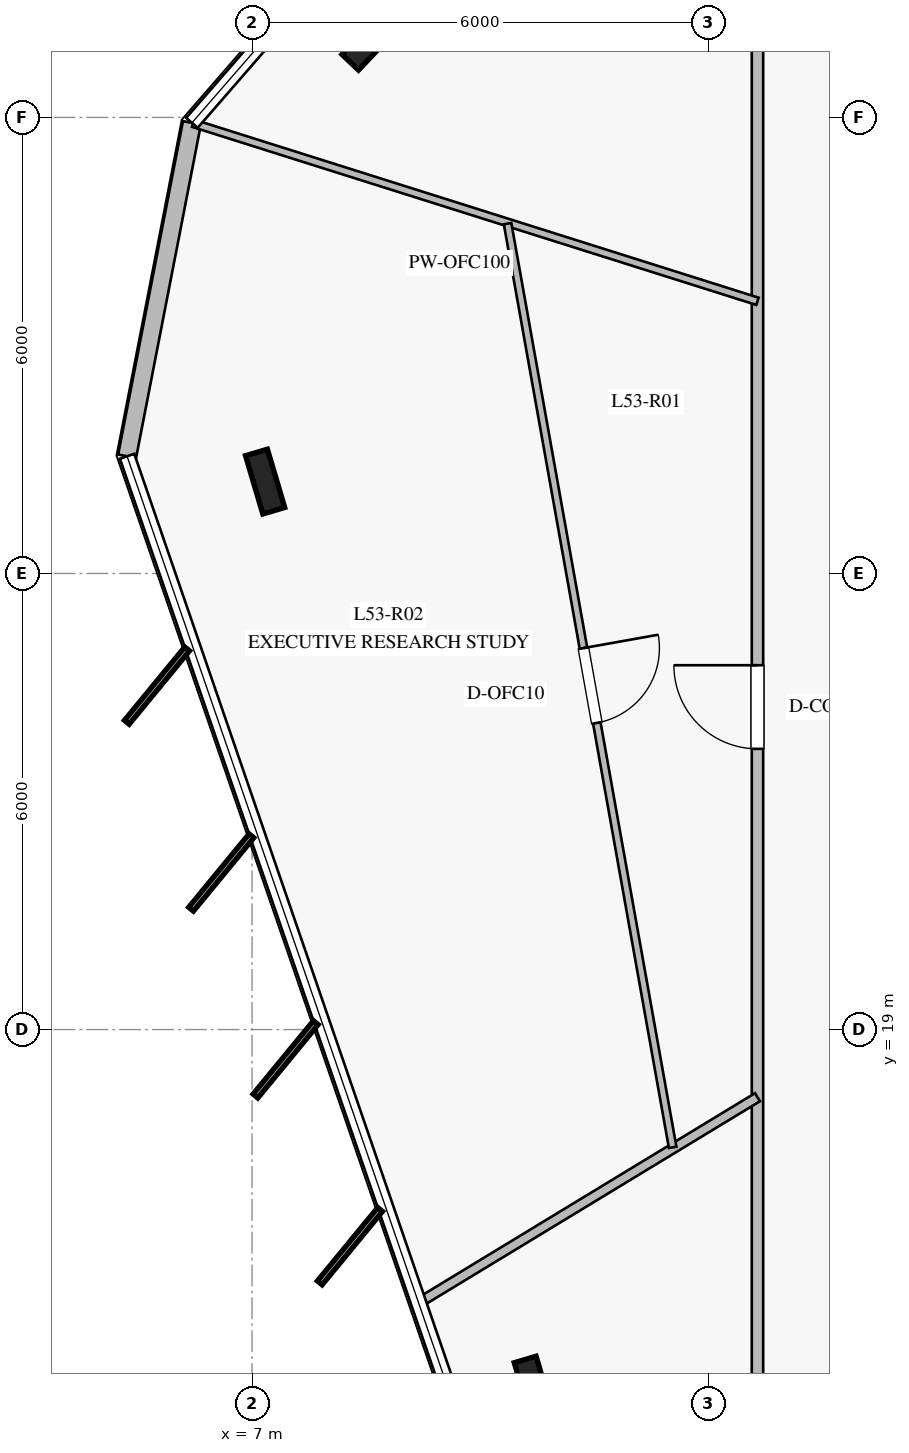
"""IFC4 building model, lengths in metres.
Left out: names, types, materials, properties, quantities, classifications, styles, units other than length and angle.
Written with IfcOpenShell. Run it as: python <this file> out.ifc"""

import sys

from ifc_helpers import new_model, si_unit, direction, frame, frame_2d, origin, origin_2d, place, context, subcontext, project, spatial, rectangle, i_section, extrude, element, fill, save


model = new_model("IFC4")
c1 = context("Model", 3, precision=1e-05, world=origin(), true_north=direction((0.0, 1.0)))
c2 = subcontext(c1, "Body", "Model", "MODEL_VIEW")
j1 = project(units=[si_unit("LENGTHUNIT", "METRE"), si_unit("PLANEANGLEUNIT", "RADIAN")], contexts=[c1])
p1 = place(None, origin())
s1 = spatial("IfcSite", under=j1, at=p1, CompositionType="ELEMENT")
p2 = place(p1, origin())
s2 = spatial("IfcBuilding", under=s1, at=p2, CompositionType="ELEMENT")
p3 = place(p2, frame((0.0, 0.0, 220.8)))
s3 = spatial("IfcBuildingStorey", under=s2, at=p3, CompositionType="ELEMENT", Elevation=220.8)
for number, where, z_axis, x_axis in (
    (1, (8.567, 32.016, 0.0), (0.0, 0.0, 1.0), (0.688, 0.725, 0.0)),
    (2, (7.172, 26.209, 0.0), (0.0, 0.0, 1.0), (-0.284, 0.959, 0.0)),
    (3, (10.707, 14.276, 0.0), (0.0, 0.0, 1.0), (-0.284, 0.959, 0.0)),
):
    element("IfcColumn", number, at=place(p3, frame(where, z_axis=z_axis, x_axis=x_axis)), inside=s3, PredefinedType="COLUMN", context=c2, shape_type="SweptSolid", body=[
        extrude(i_section(OverallWidth=0.3, OverallDepth=0.8, WebThickness=0.018, FlangeThickness=0.033, at=origin_2d()), origin(), (0.0, 0.0, 1.0), 4.0),
    ])
p4 = place(p3, frame((6.209, 30.929, 0.0), z_axis=(0.0, 0.0, 1.0), x_axis=(-0.190871121271, -0.981615105357, 0.0)))
e4 = element("IfcWall", 4, at=p4, inside=s3, PredefinedType="STANDARD", context=c2, shape_type="SweptSolid", body=[
    extrude(rectangle(XDim=4.469, YDim=0.24, at=frame_2d((2.235, 0.0))), origin(), (0.0, 0.0, 1.0), 3.78),
])
p5 = place(p3, frame((13.65, 14.25, 0.0), z_axis=(0.0, 0.0, 1.0), x_axis=(0.0, 1.0, 0.0)))
e5 = element("IfcWall", 5, at=p5, inside=s3, PredefinedType="PARTITIONING", context=c2, shape_type="SweptSolid", body=[
    extrude(rectangle(XDim=21.5, YDim=0.15, at=frame_2d((10.75, 0.0))), origin(), (0.0, 0.0, 1.0), 3.05),
])
p6 = place(p5, frame((8.443, 0.0, 0.0)))
e6 = element("IfcOpeningElement", 6, at=p6, cuts=e5, PredefinedType="OPENING", context=c2, shape_type="SweptSolid", body=[
    extrude(rectangle(XDim=1.1, YDim=2.2, at=frame_2d((0.55, 1.1))), frame((0.0, 0.085, 0.0), z_axis=(0.0, -1.0, 0.0), x_axis=(1.0, 0.0, 0.0)), (0.0, 0.0, 1.0), 0.17),
])
p7 = place(p3, frame((13.65, 28.581, 0.0), z_axis=(0.0, 0.0, 1.0), x_axis=(-0.953668418843, 0.300859679754, 0.0)))
e7 = element("IfcWall", 7, at=p7, inside=s3, PredefinedType="MOVABLE", context=c2, shape_type="SweptSolid", body=[
    extrude(rectangle(XDim=7.784, YDim=0.1, at=frame_2d((3.892, 0.0))), origin(), (0.0, 0.0, 1.0), 3.18),
])
p8 = place(p3, frame((13.65, 18.11, 0.0), z_axis=(0.0, 0.0, 1.0), x_axis=(-0.854791979371, -0.518970781454, 0.0)))
e8 = element("IfcWall", 8, at=p8, inside=s3, PredefinedType="PARTITIONING", context=c2, shape_type="SweptSolid", body=[
    extrude(rectangle(XDim=5.199, YDim=0.125, at=frame_2d((2.599, 0.0))), origin(), (0.0, 0.0, 1.0), 3.18),
])
p9 = place(p3, frame((10.362, 29.603, 0.0), z_axis=(0.0, 0.0, 1.0), x_axis=(0.175922734222, -0.984403977838, 0.0)))
e9 = element("IfcWall", 9, at=p9, inside=s3, PredefinedType="MOVABLE", context=c2, shape_type="SweptSolid", body=[
    extrude(rectangle(XDim=12.346, YDim=0.1, at=frame_2d((6.173, 0.0))), origin(), (0.0, 0.0, 1.0), 3.25),
])
p10 = place(p9, frame((5.673, 0.0, 0.0)))
e10 = element("IfcOpeningElement", 10, at=p10, cuts=e9, PredefinedType="OPENING", context=c2, shape_type="SweptSolid", body=[
    extrude(rectangle(XDim=1.0, YDim=2.15, at=frame_2d((0.5, 1.075))), frame((0.0, 0.06, 0.0), z_axis=(0.0, -1.0, 0.0), x_axis=(1.0, 0.0, 0.0)), (0.0, 0.0, 1.0), 0.12),
])
p11 = place(p6, origin())
e11 = element("IfcDoor", 11, at=p11, inside=s3, OperationType="SINGLE_SWING_RIGHT", PredefinedType="DOOR", context=c2, shape_type="SweptSolid", body=[
    extrude(rectangle(XDim=1.1, YDim=2.2, at=frame_2d((0.55, 1.1))), frame((0.0, 0.025, 0.0), z_axis=(0.0, -1.0, 0.0), x_axis=(1.0, 0.0, 0.0)), (0.0, 0.0, 1.0), 0.05),
])
fill(e6, e11)
p12 = place(p10, origin())
e12 = element("IfcDoor", 12, at=p12, inside=s3, OperationType="SINGLE_SWING_LEFT", PredefinedType="DOOR", context=c2, shape_type="SweptSolid", body=[
    extrude(rectangle(XDim=1.0, YDim=2.15, at=frame_2d((0.5, 1.075))), frame((0.0, 0.025, 0.0), z_axis=(0.0, -1.0, 0.0), x_axis=(1.0, 0.0, 0.0)), (0.0, 0.0, 1.0), 0.05),
])
fill(e10, e12)
save(model, sys.argv[1])
